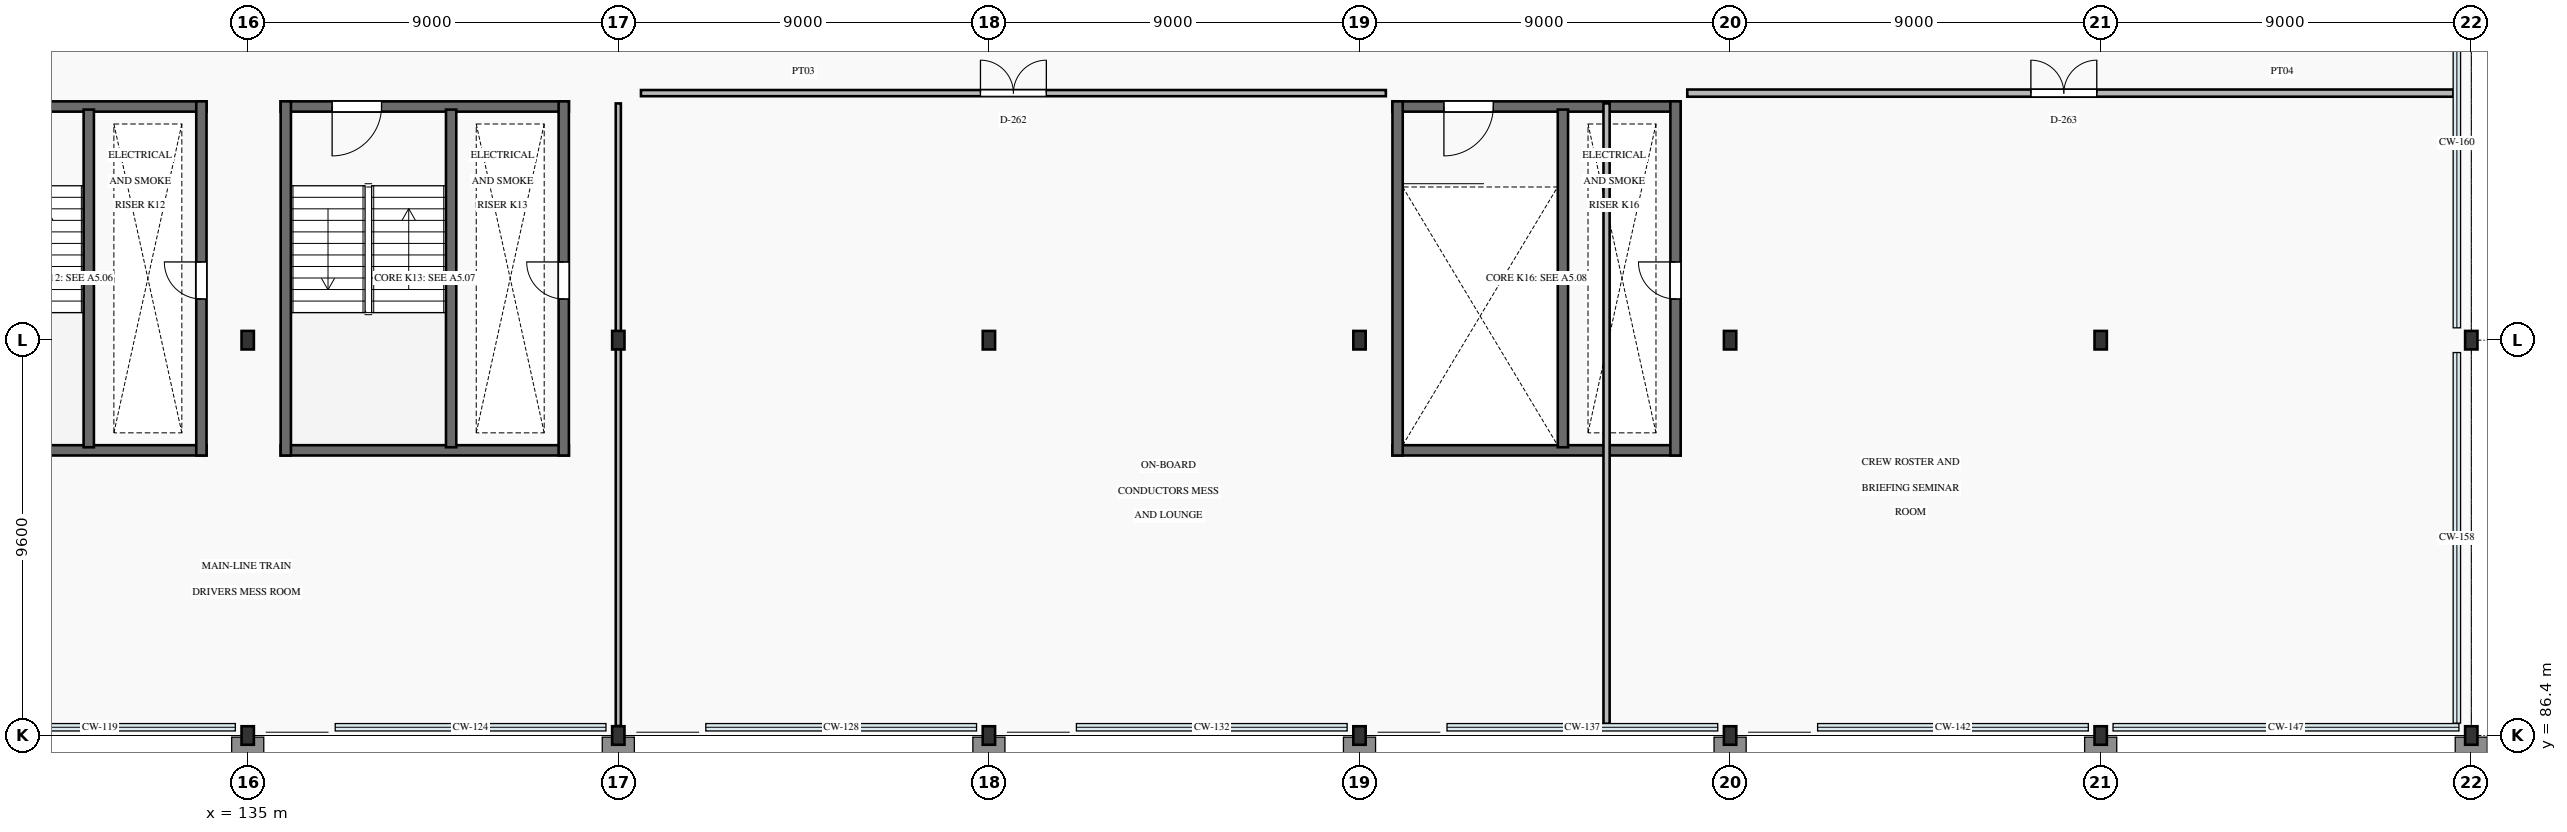
"""IFC4 building model, lengths in metres.
Left out: names, types, materials, properties, quantities, classifications, styles, units other than length and angle.
Written with IfcOpenShell. Run it as: python <this file> out.ifc"""

import sys

from ifc_helpers import new_model, si_unit, direction, frame, frame_2d, origin, origin_2d, place, context, subcontext, project, spatial, rectangle, i_section, extrude, element, fill, save


model = new_model("IFC4")
c1 = context("Model", 3, precision=1e-05, world=origin(), true_north=direction((0.0, 1.0)))
c2 = subcontext(c1, "Body", "Model", "MODEL_VIEW")
j1 = project(units=[si_unit("LENGTHUNIT", "METRE"), si_unit("PLANEANGLEUNIT", "RADIAN")], contexts=[c1])
p1 = place(None, origin())
s1 = spatial("IfcSite", under=j1, at=p1, CompositionType="ELEMENT")
p2 = place(p1, origin())
s2 = spatial("IfcBuilding", under=s1, at=p2, CompositionType="ELEMENT")
p3 = place(p2, frame((0.0, 0.0, 10.8)))
s3 = spatial("IfcBuildingStorey", under=s2, at=p3, CompositionType="ELEMENT", Elevation=10.8)
for number, where, z_axis, x_axis in (
    (1, (135.0, 86.4, 0.0), (0.0, 0.0, 1.0), (1.0, 0.0, 0.0)),
    (2, (135.0, 96.0, 0.0), (0.0, 0.0, 1.0), (1.0, 0.0, 0.0)),
    (3, (144.0, 86.4, 0.0), (0.0, 0.0, 1.0), (1.0, 0.0, 0.0)),
    (4, (144.0, 96.0, 0.0), (0.0, 0.0, 1.0), (1.0, 0.0, 0.0)),
    (5, (153.0, 86.4, 0.0), (0.0, 0.0, 1.0), (1.0, 0.0, 0.0)),
    (6, (153.0, 96.0, 0.0), (0.0, 0.0, 1.0), (1.0, 0.0, 0.0)),
    (7, (162.0, 86.4, 0.0), (0.0, 0.0, 1.0), (1.0, 0.0, 0.0)),
    (8, (162.0, 96.0, 0.0), (0.0, 0.0, 1.0), (1.0, 0.0, 0.0)),
    (9, (171.0, 86.4, 0.0), (0.0, 0.0, 1.0), (1.0, 0.0, 0.0)),
    (10, (171.0, 96.0, 0.0), (0.0, 0.0, 1.0), (1.0, 0.0, 0.0)),
    (11, (180.0, 86.4, 0.0), (0.0, 0.0, 1.0), (1.0, 0.0, 0.0)),
    (12, (180.0, 96.0, 0.0), (0.0, 0.0, 1.0), (1.0, 0.0, 0.0)),
    (13, (189.0, 86.4, 0.0), (0.0, 0.0, 1.0), (1.0, 0.0, 0.0)),
    (14, (189.0, 96.0, 0.0), (0.0, 0.0, 1.0), (1.0, 0.0, 0.0)),
):
    element("IfcColumn", number, at=place(p3, frame(where, z_axis=z_axis, x_axis=x_axis)), inside=s3, PredefinedType="COLUMN", context=c2, shape_type="SweptSolid", body=[
        extrude(i_section(OverallWidth=0.3, OverallDepth=0.45, WebThickness=0.014, FlangeThickness=0.026, FilletRadius=0.027, at=origin_2d()), origin(), (0.0, 0.0, 1.0), 4.2),
    ])
p4 = place(p3, frame((127.0, 93.325, 0.0), z_axis=(0.0, 0.0, 1.0), x_axis=(1.0, 0.0, 0.0)))
e15 = element("IfcWall", 15, at=p4, inside=s3, PredefinedType="SHEAR", context=c2, shape_type="SweptSolid", body=[
    extrude(rectangle(XDim=7.0, YDim=0.25, at=frame_2d((3.5, 0.0))), origin(), (0.0, 0.0, 1.0), 4.2),
])
p5 = place(p3, frame((127.0, 101.675, 0.0), z_axis=(0.0, 0.0, 1.0), x_axis=(1.0, 0.0, 0.0)))
e16 = element("IfcWall", 16, at=p5, inside=s3, PredefinedType="SHEAR", context=c2, shape_type="SweptSolid", body=[
    extrude(rectangle(XDim=7.0, YDim=0.25, at=frame_2d((3.5, 0.0))), origin(), (0.0, 0.0, 1.0), 4.2),
])
p6 = place(p5, frame((1.25, 0.0, 0.0)))
e17 = element("IfcOpeningElement", 17, at=p6, cuts=e16, PredefinedType="OPENING", context=c2, shape_type="SweptSolid", body=[
    extrude(rectangle(XDim=1.2, YDim=2.15, at=frame_2d((0.6, 1.075))), frame((0.0, 0.14, 0.0), z_axis=(0.0, -1.0, 0.0), x_axis=(1.0, 0.0, 0.0)), (0.0, 0.0, 1.0), 0.28),
])
p7 = place(p3, frame((133.875, 93.2, 0.0), z_axis=(0.0, 0.0, 1.0), x_axis=(0.0, 1.0, 0.0)))
e18 = element("IfcWall", 18, at=p7, inside=s3, PredefinedType="SHEAR", context=c2, shape_type="SweptSolid", body=[
    extrude(rectangle(XDim=8.6, YDim=0.25, at=frame_2d((4.3, 0.0))), origin(), (0.0, 0.0, 1.0), 4.2),
])
p8 = place(p7, frame((3.8, 0.0, 0.0)))
e19 = element("IfcOpeningElement", 19, at=p8, cuts=e18, PredefinedType="OPENING", context=c2, shape_type="SweptSolid", body=[
    extrude(rectangle(XDim=0.9, YDim=2.05, at=frame_2d((0.45, 1.025))), frame((0.0, 0.14, 0.0), z_axis=(0.0, -1.0, 0.0), x_axis=(1.0, 0.0, 0.0)), (0.0, 0.0, 1.0), 0.28),
])
p9 = place(p3, frame((131.14, 93.4, 0.0), z_axis=(0.0, 0.0, 1.0), x_axis=(0.0, 1.0, 0.0)))
e20 = element("IfcWall", 20, at=p9, inside=s3, PredefinedType="SHEAR", context=c2, shape_type="SweptSolid", body=[
    extrude(rectangle(XDim=8.2, YDim=0.25, at=frame_2d((4.1, 0.0))), origin(), (0.0, 0.0, 1.0), 4.2),
])
p10 = place(p3, frame((135.8, 93.325, 0.0), z_axis=(0.0, 0.0, 1.0), x_axis=(1.0, 0.0, 0.0)))
e21 = element("IfcWall", 21, at=p10, inside=s3, PredefinedType="SHEAR", context=c2, shape_type="SweptSolid", body=[
    extrude(rectangle(XDim=7.0, YDim=0.25, at=frame_2d((3.5, 0.0))), origin(), (0.0, 0.0, 1.0), 4.2),
])
p11 = place(p3, frame((135.8, 101.675, 0.0), z_axis=(0.0, 0.0, 1.0), x_axis=(1.0, 0.0, 0.0)))
e22 = element("IfcWall", 22, at=p11, inside=s3, PredefinedType="SHEAR", context=c2, shape_type="SweptSolid", body=[
    extrude(rectangle(XDim=7.0, YDim=0.25, at=frame_2d((3.5, 0.0))), origin(), (0.0, 0.0, 1.0), 4.2),
])
p12 = place(p11, frame((1.25, 0.0, 0.0)))
e23 = element("IfcOpeningElement", 23, at=p12, cuts=e22, PredefinedType="OPENING", context=c2, shape_type="SweptSolid", body=[
    extrude(rectangle(XDim=1.2, YDim=2.15, at=frame_2d((0.6, 1.075))), frame((0.0, 0.14, 0.0), z_axis=(0.0, -1.0, 0.0), x_axis=(1.0, 0.0, 0.0)), (0.0, 0.0, 1.0), 0.28),
])
p13 = place(p3, frame((135.925, 93.2, 0.0), z_axis=(0.0, 0.0, 1.0), x_axis=(0.0, 1.0, 0.0)))
e24 = element("IfcWall", 24, at=p13, inside=s3, PredefinedType="SHEAR", context=c2, shape_type="SweptSolid", body=[
    extrude(rectangle(XDim=8.6, YDim=0.25, at=frame_2d((4.3, 0.0))), origin(), (0.0, 0.0, 1.0), 4.2),
])
p14 = place(p3, frame((142.675, 93.2, 0.0), z_axis=(0.0, 0.0, 1.0), x_axis=(0.0, 1.0, 0.0)))
e25 = element("IfcWall", 25, at=p14, inside=s3, PredefinedType="SHEAR", context=c2, shape_type="SweptSolid", body=[
    extrude(rectangle(XDim=8.6, YDim=0.25, at=frame_2d((4.3, 0.0))), origin(), (0.0, 0.0, 1.0), 4.2),
])
p15 = place(p14, frame((3.8, 0.0, 0.0)))
e26 = element("IfcOpeningElement", 26, at=p15, cuts=e25, PredefinedType="OPENING", context=c2, shape_type="SweptSolid", body=[
    extrude(rectangle(XDim=0.9, YDim=2.05, at=frame_2d((0.45, 1.025))), frame((0.0, 0.14, 0.0), z_axis=(0.0, -1.0, 0.0), x_axis=(1.0, 0.0, 0.0)), (0.0, 0.0, 1.0), 0.28),
])
p16 = place(p3, frame((139.94, 93.4, 0.0), z_axis=(0.0, 0.0, 1.0), x_axis=(0.0, 1.0, 0.0)))
e27 = element("IfcWall", 27, at=p16, inside=s3, PredefinedType="SHEAR", context=c2, shape_type="SweptSolid", body=[
    extrude(rectangle(XDim=8.2, YDim=0.25, at=frame_2d((4.1, 0.0))), origin(), (0.0, 0.0, 1.0), 4.2),
])
p17 = place(p3, frame((162.8, 93.325, 0.0), z_axis=(0.0, 0.0, 1.0), x_axis=(1.0, 0.0, 0.0)))
e28 = element("IfcWall", 28, at=p17, inside=s3, PredefinedType="SHEAR", context=c2, shape_type="SweptSolid", body=[
    extrude(rectangle(XDim=7.0, YDim=0.25, at=frame_2d((3.5, 0.0))), origin(), (0.0, 0.0, 1.0), 4.2),
])
p18 = place(p3, frame((162.8, 101.675, 0.0), z_axis=(0.0, 0.0, 1.0), x_axis=(1.0, 0.0, 0.0)))
e29 = element("IfcWall", 29, at=p18, inside=s3, PredefinedType="SHEAR", context=c2, shape_type="SweptSolid", body=[
    extrude(rectangle(XDim=7.0, YDim=0.25, at=frame_2d((3.5, 0.0))), origin(), (0.0, 0.0, 1.0), 4.2),
])
p19 = place(p18, frame((1.25, 0.0, 0.0)))
e30 = element("IfcOpeningElement", 30, at=p19, cuts=e29, PredefinedType="OPENING", context=c2, shape_type="SweptSolid", body=[
    extrude(rectangle(XDim=1.2, YDim=2.15, at=frame_2d((0.6, 1.075))), frame((0.0, 0.14, 0.0), z_axis=(0.0, -1.0, 0.0), x_axis=(1.0, 0.0, 0.0)), (0.0, 0.0, 1.0), 0.28),
])
p20 = place(p3, frame((162.925, 93.2, 0.0), z_axis=(0.0, 0.0, 1.0), x_axis=(0.0, 1.0, 0.0)))
e31 = element("IfcWall", 31, at=p20, inside=s3, PredefinedType="SHEAR", context=c2, shape_type="SweptSolid", body=[
    extrude(rectangle(XDim=8.6, YDim=0.25, at=frame_2d((4.3, 0.0))), origin(), (0.0, 0.0, 1.0), 4.2),
])
p21 = place(p3, frame((169.675, 93.2, 0.0), z_axis=(0.0, 0.0, 1.0), x_axis=(0.0, 1.0, 0.0)))
e32 = element("IfcWall", 32, at=p21, inside=s3, PredefinedType="SHEAR", context=c2, shape_type="SweptSolid", body=[
    extrude(rectangle(XDim=8.6, YDim=0.25, at=frame_2d((4.3, 0.0))), origin(), (0.0, 0.0, 1.0), 4.2),
])
p22 = place(p21, frame((3.8, 0.0, 0.0)))
e33 = element("IfcOpeningElement", 33, at=p22, cuts=e32, PredefinedType="OPENING", context=c2, shape_type="SweptSolid", body=[
    extrude(rectangle(XDim=0.9, YDim=2.05, at=frame_2d((0.45, 1.025))), frame((0.0, 0.14, 0.0), z_axis=(0.0, -1.0, 0.0), x_axis=(1.0, 0.0, 0.0)), (0.0, 0.0, 1.0), 0.28),
])
p23 = place(p3, frame((166.94, 93.4, 0.0), z_axis=(0.0, 0.0, 1.0), x_axis=(0.0, 1.0, 0.0)))
e34 = element("IfcWall", 34, at=p23, inside=s3, PredefinedType="SHEAR", context=c2, shape_type="SweptSolid", body=[
    extrude(rectangle(XDim=8.2, YDim=0.25, at=frame_2d((4.1, 0.0))), origin(), (0.0, 0.0, 1.0), 4.2),
])
p24 = place(p3, frame((144.55, 102.0, 0.0), z_axis=(0.0, 0.0, 1.0), x_axis=(1.0, 0.0, 0.0)))
e35 = element("IfcWall", 35, at=p24, inside=s3, PredefinedType="PARTITIONING", context=c2, shape_type="SweptSolid", body=[
    extrude(rectangle(XDim=18.09, YDim=0.15, at=frame_2d((9.045, 0.0))), origin(), (0.0, 0.0, 1.0), 3.94),
])
p25 = place(p24, frame((8.245, 0.0, 0.0)))
e36 = element("IfcOpeningElement", 36, at=p25, cuts=e35, PredefinedType="OPENING", context=c2, shape_type="SweptSolid", body=[
    extrude(rectangle(XDim=1.6, YDim=2.25, at=frame_2d((0.8, 1.125))), frame((0.0, 0.09, 0.0), z_axis=(0.0, -1.0, 0.0), x_axis=(1.0, 0.0, 0.0)), (0.0, 0.0, 1.0), 0.18),
])
p26 = place(p3, frame((169.96, 102.0, 0.0), z_axis=(0.0, 0.0, 1.0), x_axis=(1.0, 0.0, 0.0)))
e37 = element("IfcWall", 37, at=p26, inside=s3, PredefinedType="PARTITIONING", context=c2, shape_type="SweptSolid", body=[
    extrude(rectangle(XDim=18.605, YDim=0.175, at=frame_2d((9.302, 0.0))), origin(), (0.0, 0.0, 1.0), 3.94),
])
p27 = place(p26, frame((8.345, 0.0, 0.0)))
e38 = element("IfcOpeningElement", 38, at=p27, cuts=e37, PredefinedType="OPENING", context=c2, shape_type="SweptSolid", body=[
    extrude(rectangle(XDim=1.6, YDim=2.25, at=frame_2d((0.8, 1.125))), frame((0.0, 0.103, 0.0), z_axis=(0.0, -1.0, 0.0), x_axis=(1.0, 0.0, 0.0)), (0.0, 0.0, 1.0), 0.205),
])
p28 = place(p3, frame((144.0, 86.63, 0.0), z_axis=(0.0, 0.0, 1.0), x_axis=(0.0, 1.0, 0.0)))
e39 = element("IfcWall", 39, at=p28, inside=s3, PredefinedType="PARTITIONING", context=c2, shape_type="SweptSolid", body=[
    extrude(rectangle(XDim=15.12, YDim=0.125, at=frame_2d((7.56, 0.0))), origin(), (0.0, 0.0, 1.0), 3.61),
])
p29 = place(p3, frame((168.0, 86.685, 0.0), z_axis=(0.0, 0.0, 1.0), x_axis=(0.0, 1.0, 0.0)))
e40 = element("IfcWall", 40, at=p29, inside=s3, PredefinedType="PARTITIONING", context=c2, shape_type="SweptSolid", body=[
    extrude(rectangle(XDim=15.065, YDim=0.15, at=frame_2d((7.532, 0.0))), origin(), (0.0, 0.0, 1.0), 3.94),
])
p30 = place(p8, origin())
e41 = element("IfcDoor", 41, at=p30, inside=s3, OperationType="SINGLE_SWING_RIGHT", PredefinedType="DOOR", context=c2, shape_type="SweptSolid", body=[
    extrude(rectangle(XDim=0.9, YDim=2.05, at=frame_2d((0.45, 1.025))), frame((0.0, 0.025, 0.0), z_axis=(0.0, -1.0, 0.0), x_axis=(1.0, 0.0, 0.0)), (0.0, 0.0, 1.0), 0.05),
])
fill(e19, e41)
p31 = place(p12, frame((1.2, 0.0, 0.0), z_axis=(0.0, 0.0, 1.0), x_axis=(-1.0, 0.0, 0.0)))
e42 = element("IfcDoor", 42, at=p31, inside=s3, OperationType="SINGLE_SWING_LEFT", PredefinedType="DOOR", context=c2, shape_type="SweptSolid", body=[
    extrude(rectangle(XDim=1.2, YDim=2.15, at=frame_2d((0.6, 1.075))), frame((0.0, 0.025, 0.0), z_axis=(0.0, -1.0, 0.0), x_axis=(1.0, 0.0, 0.0)), (0.0, 0.0, 1.0), 0.05),
])
fill(e23, e42)
p32 = place(p15, origin())
e43 = element("IfcDoor", 43, at=p32, inside=s3, OperationType="SINGLE_SWING_RIGHT", PredefinedType="DOOR", context=c2, shape_type="SweptSolid", body=[
    extrude(rectangle(XDim=0.9, YDim=2.05, at=frame_2d((0.45, 1.025))), frame((0.0, 0.025, 0.0), z_axis=(0.0, -1.0, 0.0), x_axis=(1.0, 0.0, 0.0)), (0.0, 0.0, 1.0), 0.05),
])
fill(e26, e43)
p33 = place(p19, frame((1.2, 0.0, 0.0), z_axis=(0.0, 0.0, 1.0), x_axis=(-1.0, 0.0, 0.0)))
e44 = element("IfcDoor", 44, at=p33, inside=s3, OperationType="SINGLE_SWING_LEFT", PredefinedType="DOOR", context=c2, shape_type="SweptSolid", body=[
    extrude(rectangle(XDim=1.2, YDim=2.15, at=frame_2d((0.6, 1.075))), frame((0.0, 0.025, 0.0), z_axis=(0.0, -1.0, 0.0), x_axis=(1.0, 0.0, 0.0)), (0.0, 0.0, 1.0), 0.05),
])
fill(e30, e44)
p34 = place(p22, origin())
e45 = element("IfcDoor", 45, at=p34, inside=s3, OperationType="SINGLE_SWING_RIGHT", PredefinedType="DOOR", context=c2, shape_type="SweptSolid", body=[
    extrude(rectangle(XDim=0.9, YDim=2.05, at=frame_2d((0.45, 1.025))), frame((0.0, 0.025, 0.0), z_axis=(0.0, -1.0, 0.0), x_axis=(1.0, 0.0, 0.0)), (0.0, 0.0, 1.0), 0.05),
])
fill(e33, e45)
p35 = place(p25, origin())
e46 = element("IfcDoor", 46, at=p35, inside=s3, OperationType="DOUBLE_DOOR_SINGLE_SWING", PredefinedType="DOOR", context=c2, shape_type="SweptSolid", body=[
    extrude(rectangle(XDim=1.6, YDim=2.25, at=frame_2d((0.8, 1.125))), frame((0.0, 0.025, 0.0), z_axis=(0.0, -1.0, 0.0), x_axis=(1.0, 0.0, 0.0)), (0.0, 0.0, 1.0), 0.05),
])
fill(e36, e46)
p36 = place(p27, origin())
e47 = element("IfcDoor", 47, at=p36, inside=s3, OperationType="DOUBLE_DOOR_SINGLE_SWING", PredefinedType="DOOR", context=c2, shape_type="SweptSolid", body=[
    extrude(rectangle(XDim=1.6, YDim=2.25, at=frame_2d((0.8, 1.125))), frame((0.0, 0.025, 0.0), z_axis=(0.0, -1.0, 0.0), x_axis=(1.0, 0.0, 0.0)), (0.0, 0.0, 1.0), 0.05),
])
fill(e38, e47)
save(model, sys.argv[1])
